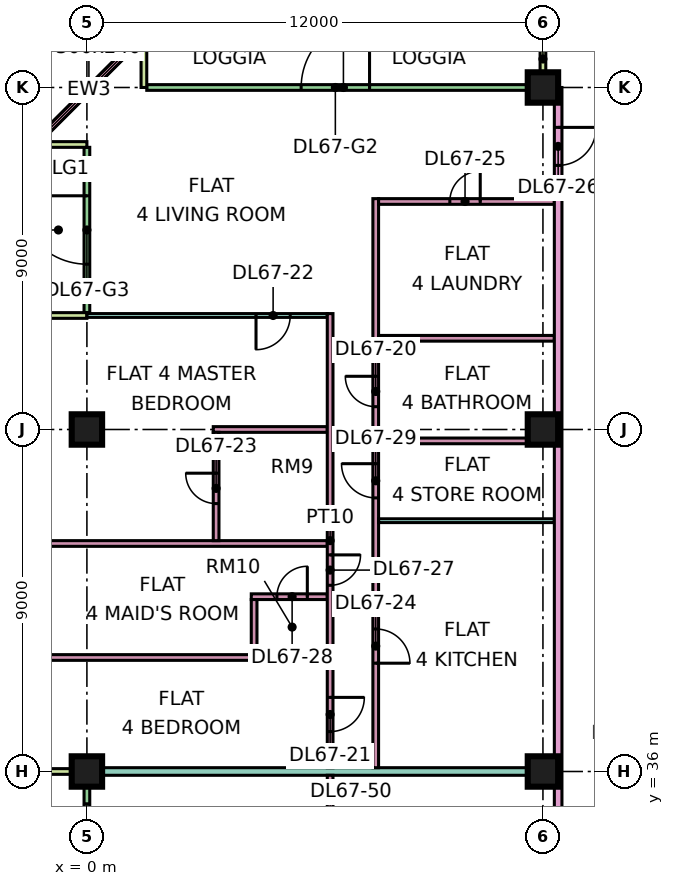
"""IFC4 building model, lengths in metres.
Left out: names, types, materials, properties, quantities, classifications, styles, units other than length and angle.
Written with IfcOpenShell. Run it as: python <this file> out.ifc"""

import sys

from ifc_helpers import new_model, si_unit, direction, frame, frame_2d, origin, origin_2d, place, context, subcontext, project, spatial, rectangle, extrude, element, fill, save


model = new_model("IFC4")
c1 = context("Model", 3, precision=1e-05, world=origin(), true_north=direction((0.0, 1.0)))
c2 = subcontext(c1, "Body", "Model", "MODEL_VIEW")
j1 = project(units=[si_unit("LENGTHUNIT", "METRE"), si_unit("PLANEANGLEUNIT", "RADIAN")], contexts=[c1])
p1 = place(None, origin())
s1 = spatial("IfcSite", under=j1, at=p1, CompositionType="ELEMENT")
p2 = place(p1, origin())
s2 = spatial("IfcBuilding", under=s1, at=p2, CompositionType="ELEMENT")
p3 = place(p2, frame((0.0, 0.0, 288.4)))
s3 = spatial("IfcBuildingStorey", under=s2, at=p3, CompositionType="ELEMENT", Elevation=288.4)
p4 = place(p3, frame((0.0, 36.0, 0.0), z_axis=(0.0, 0.0, 1.0), x_axis=(1.0, 0.0, 0.0)))
e1 = element("IfcColumn", 1, at=p4, inside=s3, PredefinedType="COLUMN", context=c2, shape_type="SweptSolid", body=[
    extrude(rectangle(XDim=0.8, YDim=0.8, at=origin_2d()), origin(), (0.0, 0.0, 1.0), 3.75),
])
for number, where, z_axis, x_axis in (
    (2, (0.0, 45.0, 0.0), (0.0, 0.0, 1.0), (1.0, 0.0, 0.0)),
    (3, (12.0, 36.0, 0.0), (0.0, 0.0, 1.0), (1.0, 0.0, 0.0)),
    (4, (12.0, 45.0, 0.0), (0.0, 0.0, 1.0), (1.0, 0.0, 0.0)),
    (5, (12.0, 54.0, 0.0), (0.0, 0.0, 1.0), (1.0, 0.0, 0.0)),
):
    element("IfcColumn", number, at=place(p3, frame(where, z_axis=z_axis, x_axis=x_axis)), inside=s3, PredefinedType="COLUMN", context=c2, shape_type="SweptSolid", body=[
        extrude(rectangle(XDim=0.8, YDim=0.8, at=origin_2d()), origin(), (0.0, 0.0, 1.0), 3.75),
    ])
p5 = place(p3, frame((11.925, 54.0, 0.0), z_axis=(0.0, 0.0, 1.0), x_axis=(-1.0, 0.0, 0.0)))
e6 = element("IfcWall", 6, at=p5, inside=s3, PredefinedType="SOLIDWALL", context=c2, shape_type="SweptSolid", body=[
    extrude(rectangle(XDim=10.35, YDim=0.15, at=frame_2d((5.175, 0.0))), origin(), (0.0, 0.0, 1.0), 3.35),
])
p6 = place(p5, frame((4.488, 0.0, 0.0)))
e7 = element("IfcOpeningElement", 7, at=p6, cuts=e6, PredefinedType="OPENING", context=c2, shape_type="SweptSolid", body=[
    extrude(rectangle(XDim=1.8, YDim=2.4, at=frame_2d((0.9, 1.2))), frame((0.0, 0.085, 0.0), z_axis=(0.0, -1.0, 0.0), x_axis=(1.0, 0.0, 0.0)), (0.0, 0.0, 1.0), 0.17),
])
for number, where, z_axis, x_axis in (
    (8, (12.0, 55.5, 0.0), (0.0, 0.0, 1.0), (0.0, -1.0, 0.0)),
    (9, (1.5, 55.5, 0.0), (0.0, 0.0, 1.0), (0.0, -1.0, 0.0)),
):
    element("IfcWall", number, at=place(p3, frame(where, z_axis=z_axis, x_axis=x_axis)), inside=s3, PredefinedType="SOLIDWALL", context=c2, shape_type="SweptSolid", body=[
        extrude(rectangle(XDim=1.5, YDim=0.15, at=frame_2d((0.75, 0.0))), origin(), (0.0, 0.0, 1.0), 3.35),
    ])
p7 = place(p3, frame((1.553, 55.447, 0.0), z_axis=(0.0, 0.0, 1.0), x_axis=(-0.707106781187, -0.707106781187, 0.0)))
e10 = element("IfcWall", 10, at=p7, inside=s3, PredefinedType="SOLIDWALL", context=c2, shape_type="SweptSolid", body=[
    extrude(rectangle(XDim=4.243, YDim=0.15, at=frame_2d((2.121, 0.0))), origin(), (0.0, 0.0, 1.0), 3.35),
])
p8 = place(p7, frame((0.621, 0.0, 0.45)))
e11 = element("IfcOpeningElement", 11, at=p8, cuts=e10, PredefinedType="OPENING", context=c2, shape_type="SweptSolid", body=[
    extrude(rectangle(XDim=3.0, YDim=2.4, at=frame_2d((1.5, 1.2))), frame((0.0, 0.085, 0.0), z_axis=(0.0, -1.0, 0.0), x_axis=(1.0, 0.0, 0.0)), (0.0, 0.0, 1.0), 0.17),
])
p9 = place(p3, frame((0.0, 52.425, 0.0), z_axis=(0.0, 0.0, 1.0), x_axis=(0.0, -1.0, 0.0)))
e12 = element("IfcWall", 12, at=p9, inside=s3, PredefinedType="SOLIDWALL", context=c2, shape_type="SweptSolid", body=[
    extrude(rectangle(XDim=4.35, YDim=0.15, at=frame_2d((2.175, 0.0))), origin(), (0.0, 0.0, 1.0), 3.35),
])
p10 = place(p9, frame((1.275, 0.0, 0.0)))
e13 = element("IfcOpeningElement", 13, at=p10, cuts=e12, PredefinedType="OPENING", context=c2, shape_type="SweptSolid", body=[
    extrude(rectangle(XDim=1.8, YDim=2.4, at=frame_2d((0.9, 1.2))), frame((0.0, 0.085, 0.0), z_axis=(0.0, -1.0, 0.0), x_axis=(1.0, 0.0, 0.0)), (0.0, 0.0, 1.0), 0.17),
])
for number, where, z_axis, x_axis in (
    (14, (-1.5, 52.5, 0.0), (0.0, 0.0, 1.0), (1.0, 0.0, 0.0)),
    (15, (-1.5, 48.0, 0.0), (0.0, 0.0, 1.0), (1.0, 0.0, 0.0)),
):
    element("IfcWall", number, at=place(p3, frame(where, z_axis=z_axis, x_axis=x_axis)), inside=s3, PredefinedType="SOLIDWALL", context=c2, shape_type="SweptSolid", body=[
        extrude(rectangle(XDim=1.5, YDim=0.15, at=frame_2d((0.75, 0.0))), origin(), (0.0, 0.0, 1.0), 3.35),
    ])
p11 = place(p3, frame((0.0, 35.925, 0.0), z_axis=(0.0, 0.0, 1.0), x_axis=(0.0, -1.0, 0.0)))
e16 = element("IfcWall", 16, at=p11, inside=s3, PredefinedType="SOLIDWALL", context=c2, shape_type="SweptSolid", body=[
    extrude(rectangle(XDim=11.85, YDim=0.15, at=frame_2d((5.925, 0.0))), origin(), (0.0, 0.0, 1.0), 3.35),
])
p12 = place(p11, frame((0.775, 0.0, 0.45)))
e17 = element("IfcOpeningElement", 17, at=p12, cuts=e16, PredefinedType="OPENING", context=c2, shape_type="SweptSolid", body=[
    extrude(rectangle(XDim=1.8, YDim=2.4, at=frame_2d((0.9, 1.2))), frame((0.0, 0.085, 0.0), z_axis=(0.0, -1.0, 0.0), x_axis=(1.0, 0.0, 0.0)), (0.0, 0.0, 1.0), 0.17),
])
p13 = place(p11, frame((5.025, 0.0, 0.0)))
e18 = element("IfcOpeningElement", 18, at=p13, cuts=e16, PredefinedType="OPENING", context=c2, shape_type="SweptSolid", body=[
    extrude(rectangle(XDim=1.8, YDim=2.4, at=frame_2d((0.9, 1.2))), frame((0.0, 0.085, 0.0), z_axis=(0.0, -1.0, 0.0), x_axis=(1.0, 0.0, 0.0)), (0.0, 0.0, 1.0), 0.17),
])
p14 = place(p11, frame((9.275, 0.0, 0.45)))
e19 = element("IfcOpeningElement", 19, at=p14, cuts=e16, PredefinedType="OPENING", context=c2, shape_type="SweptSolid", body=[
    extrude(rectangle(XDim=1.8, YDim=2.4, at=frame_2d((0.9, 1.2))), frame((0.0, 0.085, 0.0), z_axis=(0.0, -1.0, 0.0), x_axis=(1.0, 0.0, 0.0)), (0.0, 0.0, 1.0), 0.17),
])
p15 = place(p3, frame((-1.5, 36.0, 0.0), z_axis=(0.0, 0.0, 1.0), x_axis=(1.0, 0.0, 0.0)))
e20 = element("IfcWall", 20, at=p15, inside=s3, PredefinedType="SOLIDWALL", context=c2, shape_type="SweptSolid", body=[
    extrude(rectangle(XDim=1.5, YDim=0.15, at=frame_2d((0.75, 0.0))), origin(), (0.0, 0.0, 1.0), 3.35),
])
for number, where, z_axis, x_axis in (
    (21, (-1.351, 39.0, 0.0), (0.0, 0.0, 1.0), (1.0, 0.0, 0.0)),
    (22, (-1.351, 42.0, 0.0), (0.0, 0.0, 1.0), (1.0, 0.0, 0.0)),
):
    element("IfcWall", number, at=place(p3, frame(where, z_axis=z_axis, x_axis=x_axis)), inside=s3, PredefinedType="PARTITIONING", context=c2, shape_type="SweptSolid", body=[
        extrude(rectangle(XDim=7.676, YDim=0.15, at=frame_2d((3.838, 0.0))), origin(), (0.0, 0.0, 1.0), 3.35),
    ])
e23 = element("IfcWall", 23, at=p4, inside=s3, PredefinedType="PARTITIONING", context=c2, shape_type="SweptSolid", body=[
    extrude(rectangle(XDim=12.3, YDim=0.2, at=frame_2d((6.15, 0.0))), origin(), (0.0, 0.0, 1.0), 3.35),
])
p16 = place(p3, frame((0.0, 48.0, 0.0), z_axis=(0.0, 0.0, 1.0), x_axis=(1.0, 0.0, 0.0)))
e24 = element("IfcWall", 24, at=p16, inside=s3, PredefinedType="PARTITIONING", context=c2, shape_type="SweptSolid", body=[
    extrude(rectangle(XDim=6.325, YDim=0.1, at=frame_2d((3.163, 0.0))), origin(), (0.0, 0.0, 1.0), 3.35),
])
p17 = place(p16, frame((4.45, 0.0, 0.0)))
e25 = element("IfcOpeningElement", 25, at=p17, cuts=e24, PredefinedType="OPENING", context=c2, shape_type="SweptSolid", body=[
    extrude(rectangle(XDim=0.9, YDim=2.1, at=frame_2d((0.45, 1.05))), frame((0.0, 0.06, 0.0), z_axis=(0.0, -1.0, 0.0), x_axis=(1.0, 0.0, 0.0)), (0.0, 0.0, 1.0), 0.12),
])
p18 = place(p3, frame((3.325, 45.0, 0.0), z_axis=(0.0, 0.0, 1.0), x_axis=(1.0, 0.0, 0.0)))
e26 = element("IfcWall", 26, at=p18, inside=s3, PredefinedType="PARTITIONING", context=c2, shape_type="SweptSolid", body=[
    extrude(rectangle(XDim=3.0, YDim=0.15, at=frame_2d((1.5, 0.0))), origin(), (0.0, 0.0, 1.0), 3.35),
])
p19 = place(p3, frame((3.4, 42.075, 0.0), z_axis=(0.0, 0.0, 1.0), x_axis=(0.0, 1.0, 0.0)))
e27 = element("IfcWall", 27, at=p19, inside=s3, PredefinedType="PARTITIONING", context=c2, shape_type="SweptSolid", body=[
    extrude(rectangle(XDim=2.85, YDim=0.15, at=frame_2d((1.425, 0.0))), origin(), (0.0, 0.0, 1.0), 3.35),
])
p20 = place(p19, frame((0.975, 0.0, 0.0)))
e28 = element("IfcOpeningElement", 28, at=p20, cuts=e27, PredefinedType="OPENING", context=c2, shape_type="SweptSolid", body=[
    extrude(rectangle(XDim=0.8, YDim=2.1, at=frame_2d((0.4, 1.05))), frame((0.0, 0.085, 0.0), z_axis=(0.0, -1.0, 0.0), x_axis=(1.0, 0.0, 0.0)), (0.0, 0.0, 1.0), 0.17),
])
p21 = place(p3, frame((4.325, 40.6, 0.0), z_axis=(0.0, 0.0, 1.0), x_axis=(1.0, 0.0, 0.0)))
e29 = element("IfcWall", 29, at=p21, inside=s3, PredefinedType="PARTITIONING", context=c2, shape_type="SweptSolid", body=[
    extrude(rectangle(XDim=2.0, YDim=0.15, at=frame_2d((1.0, 0.0))), origin(), (0.0, 0.0, 1.0), 3.35),
])
p22 = place(p21, frame((0.675, 0.0, 0.0)))
e30 = element("IfcOpeningElement", 30, at=p22, cuts=e29, PredefinedType="OPENING", context=c2, shape_type="SweptSolid", body=[
    extrude(rectangle(XDim=0.8, YDim=2.1, at=frame_2d((0.4, 1.05))), frame((0.0, 0.085, 0.0), z_axis=(0.0, -1.0, 0.0), x_axis=(1.0, 0.0, 0.0)), (0.0, 0.0, 1.0), 0.17),
])
p23 = place(p3, frame((4.4, 39.075, 0.0), z_axis=(0.0, 0.0, 1.0), x_axis=(0.0, 1.0, 0.0)))
e31 = element("IfcWall", 31, at=p23, inside=s3, PredefinedType="PARTITIONING", context=c2, shape_type="SweptSolid", body=[
    extrude(rectangle(XDim=1.45, YDim=0.15, at=frame_2d((0.725, 0.0))), origin(), (0.0, 0.0, 1.0), 3.35),
])
p24 = place(p3, frame((6.4, 32.95, 0.0), z_axis=(0.0, 0.0, 1.0), x_axis=(0.0, 1.0, 0.0)))
e32 = element("IfcWall", 32, at=p24, inside=s3, PredefinedType="PARTITIONING", context=c2, shape_type="SweptSolid", body=[
    extrude(rectangle(XDim=2.95, YDim=0.15, at=frame_2d((1.475, 0.0))), origin(), (0.0, 0.0, 1.0), 3.35),
])
p25 = place(p24, frame((1.1, 0.0, 0.0)))
e33 = element("IfcOpeningElement", 33, at=p25, cuts=e32, PredefinedType="OPENING", context=c2, shape_type="SweptSolid", body=[
    extrude(rectangle(XDim=0.9, YDim=2.1, at=frame_2d((0.45, 1.05))), frame((0.0, 0.085, 0.0), z_axis=(0.0, -1.0, 0.0), x_axis=(1.0, 0.0, 0.0)), (0.0, 0.0, 1.0), 0.17),
])
p26 = place(p3, frame((6.4, 36.1, 0.0), z_axis=(0.0, 0.0, 1.0), x_axis=(0.0, 1.0, 0.0)))
e34 = element("IfcWall", 34, at=p26, inside=s3, PredefinedType="PARTITIONING", context=c2, shape_type="SweptSolid", body=[
    extrude(rectangle(XDim=11.95, YDim=0.15, at=frame_2d((5.975, 0.0))), origin(), (0.0, 0.0, 1.0), 3.35),
])
p27 = place(p26, frame((0.95, 0.0, 0.0)))
e35 = element("IfcOpeningElement", 35, at=p27, cuts=e34, PredefinedType="OPENING", context=c2, shape_type="SweptSolid", body=[
    extrude(rectangle(XDim=0.9, YDim=2.1, at=frame_2d((0.45, 1.05))), frame((0.0, 0.085, 0.0), z_axis=(0.0, -1.0, 0.0), x_axis=(1.0, 0.0, 0.0)), (0.0, 0.0, 1.0), 0.17),
])
p28 = place(p26, frame((4.8, 0.0, 0.0)))
e36 = element("IfcOpeningElement", 36, at=p28, cuts=e34, PredefinedType="OPENING", context=c2, shape_type="SweptSolid", body=[
    extrude(rectangle(XDim=0.8, YDim=2.1, at=frame_2d((0.4, 1.05))), frame((0.0, 0.085, 0.0), z_axis=(0.0, -1.0, 0.0), x_axis=(1.0, 0.0, 0.0)), (0.0, 0.0, 1.0), 0.17),
])
p29 = place(p3, frame((7.6, 36.1, 0.0), z_axis=(0.0, 0.0, 1.0), x_axis=(0.0, 1.0, 0.0)))
e37 = element("IfcWall", 37, at=p29, inside=s3, PredefinedType="PARTITIONING", context=c2, shape_type="SweptSolid", body=[
    extrude(rectangle(XDim=14.975, YDim=0.15, at=frame_2d((7.487, 0.0))), origin(), (0.0, 0.0, 1.0), 3.35),
])
p30 = place(p29, frame((9.5, 0.0, 0.0)))
e38 = element("IfcOpeningElement", 38, at=p30, cuts=e37, PredefinedType="OPENING", context=c2, shape_type="SweptSolid", body=[
    extrude(rectangle(XDim=0.8, YDim=2.1, at=frame_2d((0.4, 1.05))), frame((0.0, 0.085, 0.0), z_axis=(0.0, -1.0, 0.0), x_axis=(1.0, 0.0, 0.0)), (0.0, 0.0, 1.0), 0.17),
])
p31 = place(p29, frame((2.75, 0.0, 0.0)))
e39 = element("IfcOpeningElement", 39, at=p31, cuts=e37, PredefinedType="OPENING", context=c2, shape_type="SweptSolid", body=[
    extrude(rectangle(XDim=0.9, YDim=2.1, at=frame_2d((0.45, 1.05))), frame((0.0, 0.085, 0.0), z_axis=(0.0, -1.0, 0.0), x_axis=(1.0, 0.0, 0.0)), (0.0, 0.0, 1.0), 0.17),
])
p32 = place(p29, frame((7.1, 0.0, 0.0)))
e40 = element("IfcOpeningElement", 40, at=p32, cuts=e37, PredefinedType="OPENING", context=c2, shape_type="SweptSolid", body=[
    extrude(rectangle(XDim=0.9, YDim=2.1, at=frame_2d((0.45, 1.05))), frame((0.0, 0.085, 0.0), z_axis=(0.0, -1.0, 0.0), x_axis=(1.0, 0.0, 0.0)), (0.0, 0.0, 1.0), 0.17),
])
p33 = place(p3, frame((7.675, 42.6, 0.0), z_axis=(0.0, 0.0, 1.0), x_axis=(1.0, 0.0, 0.0)))
e41 = element("IfcWall", 41, at=p33, inside=s3, PredefinedType="PARTITIONING", context=c2, shape_type="SweptSolid", body=[
    extrude(rectangle(XDim=4.625, YDim=0.1, at=frame_2d((2.312, 0.0))), origin(), (0.0, 0.0, 1.0), 3.35),
])
for number, where, z_axis, x_axis in (
    (42, (7.675, 44.7, 0.0), (0.0, 0.0, 1.0), (1.0, 0.0, 0.0)),
    (43, (7.675, 47.4, 0.0), (0.0, 0.0, 1.0), (1.0, 0.0, 0.0)),
):
    element("IfcWall", number, at=place(p3, frame(where, z_axis=z_axis, x_axis=x_axis)), inside=s3, PredefinedType="PARTITIONING", context=c2, shape_type="SweptSolid", body=[
        extrude(rectangle(XDim=4.625, YDim=0.15, at=frame_2d((2.312, 0.0))), origin(), (0.0, 0.0, 1.0), 3.35),
    ])
p34 = place(p3, frame((7.675, 51.0, 0.0), z_axis=(0.0, 0.0, 1.0), x_axis=(1.0, 0.0, 0.0)))
e44 = element("IfcWall", 44, at=p34, inside=s3, PredefinedType="PARTITIONING", context=c2, shape_type="SweptSolid", body=[
    extrude(rectangle(XDim=4.625, YDim=0.15, at=frame_2d((2.312, 0.0))), origin(), (0.0, 0.0, 1.0), 3.35),
])
p35 = place(p34, frame((1.875, 0.0, 0.0)))
e45 = element("IfcOpeningElement", 45, at=p35, cuts=e44, PredefinedType="OPENING", context=c2, shape_type="SweptSolid", body=[
    extrude(rectangle(XDim=0.8, YDim=2.1, at=frame_2d((0.4, 1.05))), frame((0.0, 0.085, 0.0), z_axis=(0.0, -1.0, 0.0), x_axis=(1.0, 0.0, 0.0)), (0.0, 0.0, 1.0), 0.17),
])
p36 = place(p3, frame((12.4, 20.0, 0.0), z_axis=(0.0, 0.0, 1.0), x_axis=(0.0, 1.0, 0.0)))
e46 = element("IfcWall", 46, at=p36, inside=s3, PredefinedType="PARTITIONING", context=c2, shape_type="SweptSolid", body=[
    extrude(rectangle(XDim=34.0, YDim=0.2, at=frame_2d((17.0, 0.0))), origin(), (0.0, 0.0, 1.0), 3.35),
])
p37 = place(p36, frame((31.95, 0.0, 0.0)))
e47 = element("IfcOpeningElement", 47, at=p37, cuts=e46, PredefinedType="OPENING", context=c2, shape_type="SweptSolid", body=[
    extrude(rectangle(XDim=1.0, YDim=2.1, at=frame_2d((0.5, 1.05))), frame((0.0, 0.11, 0.0), z_axis=(0.0, -1.0, 0.0), x_axis=(1.0, 0.0, 0.0)), (0.0, 0.0, 1.0), 0.22),
])
p38 = place(p36, frame((0.6, 0.0, 0.0)))
e48 = element("IfcOpeningElement", 48, at=p38, cuts=e46, PredefinedType="OPENING", context=c2, shape_type="SweptSolid", body=[
    extrude(rectangle(XDim=1.2, YDim=2.1, at=frame_2d((0.6, 1.05))), frame((0.0, 0.11, 0.0), z_axis=(0.0, -1.0, 0.0), x_axis=(1.0, 0.0, 0.0)), (0.0, 0.0, 1.0), 0.22),
])
p39 = place(p36, frame((13.8, 0.0, 0.0)))
e49 = element("IfcOpeningElement", 49, at=p39, cuts=e46, PredefinedType="OPENING", context=c2, shape_type="SweptSolid", body=[
    extrude(rectangle(XDim=1.0, YDim=2.1, at=frame_2d((0.5, 1.05))), frame((0.0, 0.11, 0.0), z_axis=(0.0, -1.0, 0.0), x_axis=(1.0, 0.0, 0.0)), (0.0, 0.0, 1.0), 0.22),
])
p40 = place(p6, frame((1.8, 0.0, 0.0), z_axis=(0.0, 0.0, 1.0), x_axis=(-1.0, 0.0, 0.0)))
e50 = element("IfcDoor", 50, at=p40, inside=s3, OperationType="DOUBLE_DOOR_SINGLE_SWING", PredefinedType="DOOR", context=c2, shape_type="SweptSolid", body=[
    extrude(rectangle(XDim=1.8, YDim=2.4, at=frame_2d((0.9, 1.2))), frame((0.0, 0.025, 0.0), z_axis=(0.0, -1.0, 0.0), x_axis=(1.0, 0.0, 0.0)), (0.0, 0.0, 1.0), 0.05),
])
fill(e7, e50)
p41 = place(p8, origin())
e51 = element("IfcWindow", 51, at=p41, inside=s3, PartitioningType="SINGLE_PANEL", PredefinedType="WINDOW", context=c2, shape_type="SweptSolid", body=[
    extrude(rectangle(XDim=3.0, YDim=2.4, at=frame_2d((1.5, 1.2))), frame((0.0, 0.03, 0.0), z_axis=(0.0, -1.0, 0.0), x_axis=(1.0, 0.0, 0.0)), (0.0, 0.0, 1.0), 0.06),
])
fill(e11, e51)
p42 = place(p10, frame((1.8, 0.0, 0.0), z_axis=(0.0, 0.0, 1.0), x_axis=(-1.0, 0.0, 0.0)))
e52 = element("IfcDoor", 52, at=p42, inside=s3, OperationType="DOUBLE_DOOR_SINGLE_SWING", PredefinedType="DOOR", context=c2, shape_type="SweptSolid", body=[
    extrude(rectangle(XDim=1.8, YDim=2.4, at=frame_2d((0.9, 1.2))), frame((0.0, 0.025, 0.0), z_axis=(0.0, -1.0, 0.0), x_axis=(1.0, 0.0, 0.0)), (0.0, 0.0, 1.0), 0.05),
])
fill(e13, e52)
p43 = place(p12, origin())
e53 = element("IfcWindow", 53, at=p43, inside=s3, PartitioningType="SINGLE_PANEL", PredefinedType="WINDOW", context=c2, shape_type="SweptSolid", body=[
    extrude(rectangle(XDim=1.8, YDim=2.4, at=frame_2d((0.9, 1.2))), frame((0.0, 0.03, 0.0), z_axis=(0.0, -1.0, 0.0), x_axis=(1.0, 0.0, 0.0)), (0.0, 0.0, 1.0), 0.06),
])
fill(e17, e53)
p44 = place(p30, frame((0.8, 0.0, 0.0), z_axis=(0.0, 0.0, 1.0), x_axis=(-1.0, 0.0, 0.0)))
e54 = element("IfcDoor", 54, at=p44, inside=s3, OperationType="SINGLE_SWING_RIGHT", PredefinedType="DOOR", context=c2, shape_type="SweptSolid", body=[
    extrude(rectangle(XDim=0.8, YDim=2.1, at=frame_2d((0.4, 1.05))), frame((0.0, 0.025, 0.0), z_axis=(0.0, -1.0, 0.0), x_axis=(1.0, 0.0, 0.0)), (0.0, 0.0, 1.0), 0.05),
])
fill(e38, e54)
p45 = place(p27, origin())
e55 = element("IfcDoor", 55, at=p45, inside=s3, OperationType="SINGLE_SWING_RIGHT", PredefinedType="DOOR", context=c2, shape_type="SweptSolid", body=[
    extrude(rectangle(XDim=0.9, YDim=2.1, at=frame_2d((0.45, 1.05))), frame((0.0, 0.025, 0.0), z_axis=(0.0, -1.0, 0.0), x_axis=(1.0, 0.0, 0.0)), (0.0, 0.0, 1.0), 0.05),
])
fill(e35, e55)
p46 = place(p17, frame((0.9, 0.0, 0.0), z_axis=(0.0, 0.0, 1.0), x_axis=(-1.0, 0.0, 0.0)))
e56 = element("IfcDoor", 56, at=p46, inside=s3, OperationType="SINGLE_SWING_LEFT", PredefinedType="DOOR", context=c2, shape_type="SweptSolid", body=[
    extrude(rectangle(XDim=0.9, YDim=2.1, at=frame_2d((0.45, 1.05))), frame((0.0, 0.025, 0.0), z_axis=(0.0, -1.0, 0.0), x_axis=(1.0, 0.0, 0.0)), (0.0, 0.0, 1.0), 0.05),
])
fill(e25, e56)
p47 = place(p20, frame((0.8, 0.0, 0.0), z_axis=(0.0, 0.0, 1.0), x_axis=(-1.0, 0.0, 0.0)))
e57 = element("IfcDoor", 57, at=p47, inside=s3, OperationType="SINGLE_SWING_RIGHT", PredefinedType="DOOR", context=c2, shape_type="SweptSolid", body=[
    extrude(rectangle(XDim=0.8, YDim=2.1, at=frame_2d((0.4, 1.05))), frame((0.0, 0.025, 0.0), z_axis=(0.0, -1.0, 0.0), x_axis=(1.0, 0.0, 0.0)), (0.0, 0.0, 1.0), 0.05),
])
fill(e28, e57)
p48 = place(p31, frame((0.9, 0.0, 0.0), z_axis=(0.0, 0.0, 1.0), x_axis=(-1.0, 0.0, 0.0)))
e58 = element("IfcDoor", 58, at=p48, inside=s3, OperationType="SINGLE_SWING_LEFT", PredefinedType="DOOR", context=c2, shape_type="SweptSolid", body=[
    extrude(rectangle(XDim=0.9, YDim=2.1, at=frame_2d((0.45, 1.05))), frame((0.0, 0.025, 0.0), z_axis=(0.0, -1.0, 0.0), x_axis=(1.0, 0.0, 0.0)), (0.0, 0.0, 1.0), 0.05),
])
fill(e39, e58)
p49 = place(p35, frame((0.8, 0.0, 0.0), z_axis=(0.0, 0.0, 1.0), x_axis=(-1.0, 0.0, 0.0)))
e59 = element("IfcDoor", 59, at=p49, inside=s3, OperationType="SINGLE_SWING_RIGHT", PredefinedType="DOOR", context=c2, shape_type="SweptSolid", body=[
    extrude(rectangle(XDim=0.8, YDim=2.1, at=frame_2d((0.4, 1.05))), frame((0.0, 0.025, 0.0), z_axis=(0.0, -1.0, 0.0), x_axis=(1.0, 0.0, 0.0)), (0.0, 0.0, 1.0), 0.05),
])
fill(e45, e59)
p50 = place(p37, origin())
e60 = element("IfcDoor", 60, at=p50, inside=s3, OperationType="SINGLE_SWING_RIGHT", PredefinedType="DOOR", context=c2, shape_type="SweptSolid", body=[
    extrude(rectangle(XDim=1.0, YDim=2.1, at=frame_2d((0.5, 1.05))), frame((0.0, 0.025, 0.0), z_axis=(0.0, -1.0, 0.0), x_axis=(1.0, 0.0, 0.0)), (0.0, 0.0, 1.0), 0.05),
])
fill(e47, e60)
p51 = place(p28, origin())
e61 = element("IfcDoor", 61, at=p51, inside=s3, OperationType="SINGLE_SWING_RIGHT", PredefinedType="DOOR", context=c2, shape_type="SweptSolid", body=[
    extrude(rectangle(XDim=0.8, YDim=2.1, at=frame_2d((0.4, 1.05))), frame((0.0, 0.025, 0.0), z_axis=(0.0, -1.0, 0.0), x_axis=(1.0, 0.0, 0.0)), (0.0, 0.0, 1.0), 0.05),
])
fill(e36, e61)
p52 = place(p22, frame((0.8, 0.0, 0.0), z_axis=(0.0, 0.0, 1.0), x_axis=(-1.0, 0.0, 0.0)))
e62 = element("IfcDoor", 62, at=p52, inside=s3, OperationType="SINGLE_SWING_RIGHT", PredefinedType="DOOR", context=c2, shape_type="SweptSolid", body=[
    extrude(rectangle(XDim=0.8, YDim=2.1, at=frame_2d((0.4, 1.05))), frame((0.0, 0.025, 0.0), z_axis=(0.0, -1.0, 0.0), x_axis=(1.0, 0.0, 0.0)), (0.0, 0.0, 1.0), 0.05),
])
fill(e30, e62)
p53 = place(p32, frame((0.9, 0.0, 0.0), z_axis=(0.0, 0.0, 1.0), x_axis=(-1.0, 0.0, 0.0)))
e63 = element("IfcDoor", 63, at=p53, inside=s3, OperationType="SINGLE_SWING_RIGHT", PredefinedType="DOOR", context=c2, shape_type="SweptSolid", body=[
    extrude(rectangle(XDim=0.9, YDim=2.1, at=frame_2d((0.45, 1.05))), frame((0.0, 0.025, 0.0), z_axis=(0.0, -1.0, 0.0), x_axis=(1.0, 0.0, 0.0)), (0.0, 0.0, 1.0), 0.05),
])
fill(e40, e63)
save(model, sys.argv[1])
